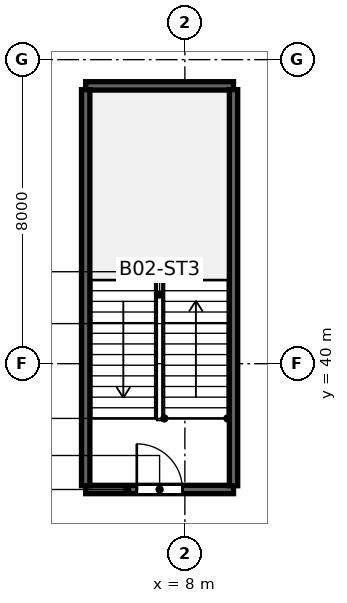
"""IFC4 building model, lengths in metres.
Left out: names, types, materials, properties, quantities, classifications, styles, units other than length and angle.
Written with IfcOpenShell. Run it as: python <this file> out.ifc"""

import sys

from ifc_helpers import new_model, si_unit, direction, frame, frame_2d, origin, place, context, subcontext, project, spatial, rectangle, extrude, source, transform, mapped, element, fill, save


model = new_model("IFC4")
c1 = context("Model", 3, precision=1e-05, world=origin(), true_north=direction((0.0, 1.0)))
c2 = subcontext(c1, "Body", "Model", "MODEL_VIEW")
j1 = project(units=[si_unit("LENGTHUNIT", "METRE"), si_unit("PLANEANGLEUNIT", "RADIAN")], contexts=[c1])
p1 = place(None, origin())
s1 = spatial("IfcSite", under=j1, at=p1, CompositionType="ELEMENT")
p2 = place(p1, origin())
s2 = spatial("IfcBuilding", under=s1, at=p2, CompositionType="ELEMENT")
p3 = place(p2, frame((0.0, 0.0, -10.0)))
s3 = spatial("IfcBuildingStorey", under=s2, at=p3, CompositionType="ELEMENT", Elevation=-10.0)
m1 = source(origin(), c2, "Body", "SweptSolid", [
    extrude(rectangle(XDim=3.89, YDim=0.22, at=frame_2d((1.945, 0.0))), origin(), (0.0, 0.0, 1.0), 5.0),
])
p4 = place(p3, frame((5.39, 36.69, 0.0), z_axis=(0.0, 0.0, 1.0), x_axis=(1.0, 0.0, 0.0)))
e1 = element("IfcWall", 1, at=p4, inside=s3, PredefinedType="SOLIDWALL", context=c2, shape_type="MappedRepresentation", body=[
    mapped(m1, transform((0.0, 0.0, 0.0), scale=1.0)),
])
p5 = place(p4, frame((1.345, 0.0, 0.0)))
e2 = element("IfcOpeningElement", 2, at=p5, cuts=e1, PredefinedType="OPENING", context=c2, shape_type="SweptSolid", body=[
    extrude(rectangle(XDim=1.2, YDim=2.15, at=frame_2d((0.6, 1.075))), frame((0.0, 0.12, 0.0), z_axis=(0.0, -1.0, 0.0), x_axis=(1.0, 0.0, 0.0)), (0.0, 0.0, 1.0), 0.24),
])
p6 = place(p3, frame((5.39, 47.31, 0.0), z_axis=(0.0, 0.0, 1.0), x_axis=(1.0, 0.0, 0.0)))
e3 = element("IfcWall", 3, at=p6, inside=s3, PredefinedType="SOLIDWALL", context=c2, shape_type="MappedRepresentation", body=[
    mapped(m1, transform((0.0, 0.0, 0.0), scale=1.0)),
])
m2 = source(origin(), c2, "Body", "SweptSolid", [
    extrude(rectangle(XDim=10.422, YDim=0.22, at=frame_2d((5.211, 0.0))), origin(), (0.0, 0.0, 1.0), 5.0),
])
for number, where, z_axis, x_axis in (
    (4, (5.39, 36.789, 0.0), (0.0, 0.0, 1.0), (0.0, 1.0, 0.0)),
    (5, (9.28, 36.789, 0.0), (0.0, 0.0, 1.0), (0.0, 1.0, 0.0)),
):
    element("IfcWall", number, at=place(p3, frame(where, z_axis=z_axis, x_axis=x_axis)), inside=s3, PredefinedType="SOLIDWALL", context=c2, shape_type="MappedRepresentation", body=[
        mapped(m2, transform((0.0, 0.0, 0.0), scale=1.0)),
    ])
m3 = source(origin(), c2, "Body", "SweptSolid", [
    extrude(rectangle(XDim=1.2, YDim=2.15, at=frame_2d((0.6, 1.075))), frame((0.0, 0.025, 0.0), z_axis=(0.0, -1.0, 0.0), x_axis=(1.0, 0.0, 0.0)), (0.0, 0.0, 1.0), 0.05),
])
p7 = place(p5, origin())
e6 = element("IfcDoor", 6, at=p7, inside=s3, OperationType="SINGLE_SWING_LEFT", PredefinedType="DOOR", context=c2, shape_type="MappedRepresentation", body=[
    mapped(m3, transform((0.0, 0.0, 0.0), scale=1.0)),
])
fill(e2, e6)
save(model, sys.argv[1])
